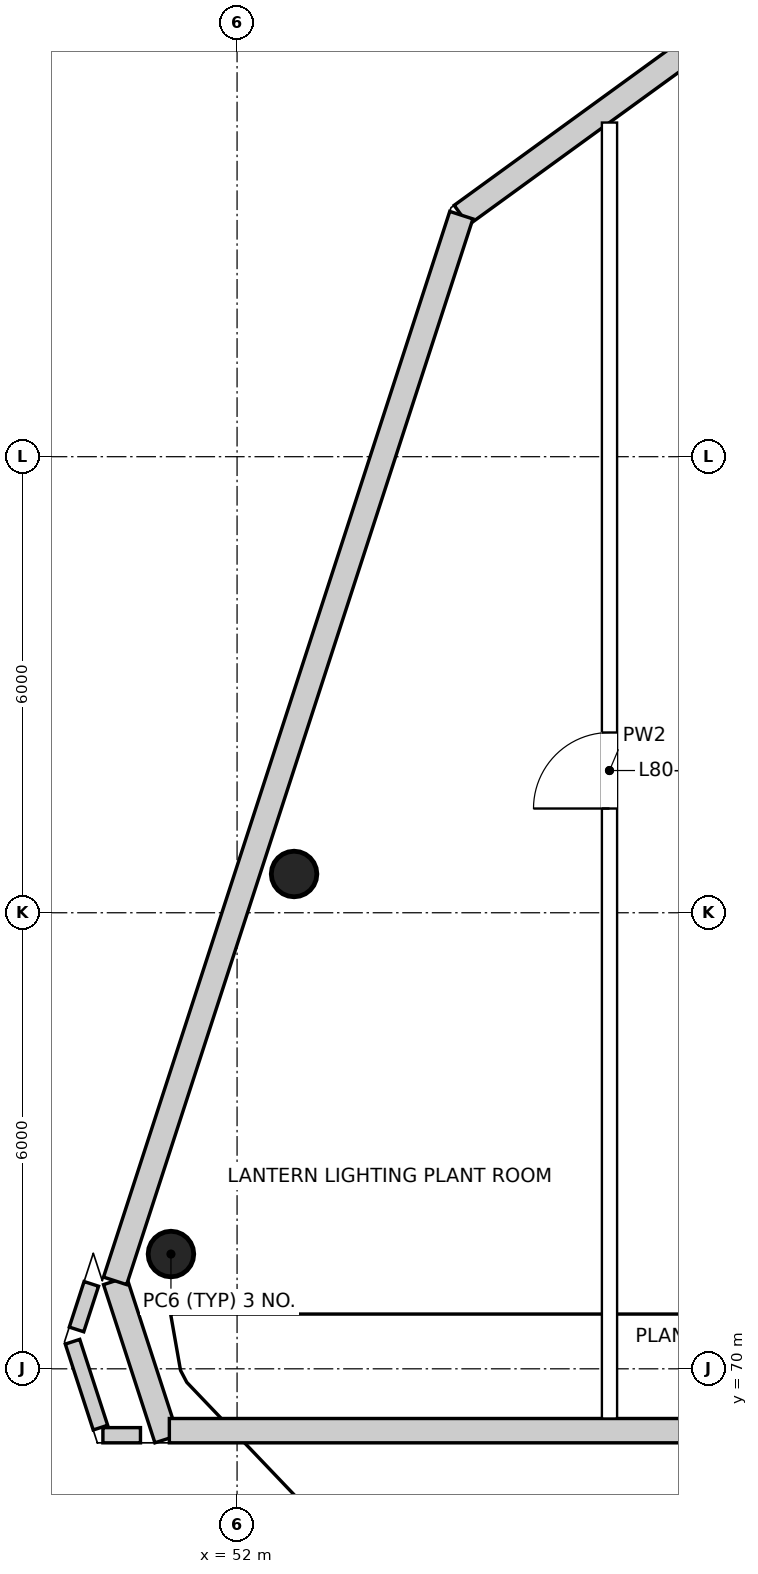
"""IFC4 building model, lengths in metres.
Left out: names, types, materials, properties, quantities, classifications, styles, units other than length and angle.
Written with IfcOpenShell. Run it as: python <this file> out.ifc"""

import sys

from ifc_helpers import new_model, si_unit, direction, frame, frame_2d, origin, origin_2d, place, context, subcontext, project, spatial, polyline, rectangle, circle, outline, extrude, element, fill, save


model = new_model("IFC4")
c1 = context("Model", 3, precision=1e-05, world=origin(), true_north=direction((0.0, 1.0)))
c2 = subcontext(c1, "Body", "Model", "MODEL_VIEW")
j1 = project(units=[si_unit("LENGTHUNIT", "METRE"), si_unit("PLANEANGLEUNIT", "RADIAN")], contexts=[c1])
p1 = place(None, origin())
s1 = spatial("IfcSite", under=j1, at=p1, CompositionType="ELEMENT")
p2 = place(p1, origin())
s2 = spatial("IfcBuilding", under=s1, at=p2, CompositionType="ELEMENT")
p3 = place(p2, frame((0.0, 0.0, 342.2)))
s3 = spatial("IfcBuildingStorey", under=s2, at=p3, CompositionType="ELEMENT", Elevation=342.2)
for number, where, z_axis, x_axis in (
    (1, (52.75, 76.51, 0.0), (0.0, 0.0, 1.0), (1.0, 0.0, 0.0)),
    (2, (51.13, 71.51, 0.0), (0.0, 0.0, 1.0), (1.0, 0.0, 0.0)),
):
    element("IfcColumn", number, at=place(p3, frame(where, z_axis=z_axis, x_axis=x_axis)), inside=s3, PredefinedType="COLUMN", context=c2, shape_type="SweptSolid", body=[
        extrude(circle(Radius=0.3, at=origin_2d()), origin(), (0.0, 0.0, 1.0), 4.5),
    ])
p4 = place(p3, frame((50.395, 71.157, 0.0), z_axis=(0.0, 0.0, 1.0), x_axis=(0.308990223282, -0.951065214334, 0.0)))
e3 = element("IfcWall", 3, at=p4, inside=s3, PredefinedType="SOLIDWALL", context=c2, shape_type="SweptSolid", body=[
    extrude(outline(polyline([(0.0, 0.0), (2.189, 0.0), (2.189, 2.744), (0.459, 4.2), (0.0, 4.2), (0.0, 0.0)])), frame((0.0, 0.16, 0.0), z_axis=(0.0, -1.0, 0.0), x_axis=(1.0, 0.0, 0.0)), (0.0, 0.0, 1.0), 0.32),
])
p5 = place(p3, frame((58.615, 87.84, 0.0), z_axis=(0.0, 0.0, 1.0), x_axis=(-0.809027332235, -0.587771023186, 0.0)))
e4 = element("IfcWall", 4, at=p5, inside=s3, PredefinedType="SOLIDWALL", context=c2, shape_type="SweptSolid", body=[
    extrude(rectangle(XDim=4.53, YDim=0.32, at=frame_2d((2.265, 0.0))), origin(), (0.0, 0.0, 1.0), 4.2),
])
p6 = place(p3, frame((54.95, 85.178, 0.0), z_axis=(0.0, 0.0, 1.0), x_axis=(-0.309009679663, -0.951058892958, 0.0)))
e5 = element("IfcWall", 5, at=p6, inside=s3, PredefinedType="SOLIDWALL", context=c2, shape_type="SweptSolid", body=[
    extrude(rectangle(XDim=14.742, YDim=0.32, at=frame_2d((7.371, 0.0))), origin(), (0.0, 0.0, 1.0), 4.2),
])
p7 = place(p3, frame((51.109, 69.186, 0.0), z_axis=(0.0, 0.0, 1.0), x_axis=(1.0, 0.0, 0.0)))
e6 = element("IfcWall", 6, at=p7, inside=s3, PredefinedType="SOLIDWALL", context=c2, shape_type="SweptSolid", body=[
    extrude(rectangle(XDim=37.782, YDim=0.32, at=frame_2d((18.891, 0.0))), origin(), (0.0, 0.0, 1.0), 2.842),
])
p8 = place(p3, frame((50.729, 69.126, 0.0), z_axis=(0.0, 0.0, 1.0), x_axis=(-1.0, 0.0, 0.0)))
e7 = element("IfcWall", 7, at=p8, inside=s3, PredefinedType="SOLIDWALL", context=c2, shape_type="SweptSolid", body=[
    extrude(rectangle(XDim=0.494, YDim=0.2, at=frame_2d((0.247, 0.0))), origin(), (0.0, 0.0, 1.0), 1.1),
])
p9 = place(p3, frame((50.202, 69.226, 0.0), z_axis=(0.0, 0.0, 1.0), x_axis=(-0.309067485778, 0.951040109162, 0.0)))
e8 = element("IfcWall", 8, at=p9, inside=s3, PredefinedType="SOLIDWALL", context=c2, shape_type="SweptSolid", body=[
    extrude(rectangle(XDim=1.188, YDim=0.2, at=frame_2d((0.594, 0.0))), origin(), (0.0, 0.0, 1.0), 1.1),
])
p10 = place(p3, frame((49.888, 70.518, 0.0), z_axis=(0.0, 0.0, 1.0), x_axis=(0.309129868594, 0.951019833833, 0.0)))
e9 = element("IfcWall", 9, at=p10, inside=s3, PredefinedType="SOLIDWALL", context=c2, shape_type="SweptSolid", body=[
    extrude(rectangle(XDim=0.63, YDim=0.2, at=frame_2d((0.315, 0.0))), origin(), (0.0, 0.0, 1.0), 1.1),
])
p11 = place(p3, frame((56.9, 69.346, 0.0), z_axis=(0.0, 0.0, 1.0), x_axis=(0.0, 1.0, 0.0)))
e10 = element("IfcWall", 10, at=p11, inside=s3, PredefinedType="PARTITIONING", context=c2, shape_type="SweptSolid", body=[
    extrude(outline(polyline([(0.0, 0.0), (17.05, 0.0), (17.05, 4.2), (0.0, 2.833), (0.0, 0.0)])), frame((0.0, 0.1, 0.0), z_axis=(0.0, -1.0, 0.0), x_axis=(1.0, 0.0, 0.0)), (0.0, 0.0, 1.0), 0.2),
])
p12 = place(p11, frame((8.025, 0.0, 0.0)))
e11 = element("IfcOpeningElement", 11, at=p12, cuts=e10, PredefinedType="OPENING", context=c2, shape_type="SweptSolid", body=[
    extrude(rectangle(XDim=1.0, YDim=2.1, at=frame_2d((0.5, 1.05))), frame((0.0, 0.11, 0.0), z_axis=(0.0, -1.0, 0.0), x_axis=(1.0, 0.0, 0.0)), (0.0, 0.0, 1.0), 0.22),
])
p13 = place(p12, origin())
e12 = element("IfcDoor", 12, at=p13, inside=s3, OperationType="SINGLE_SWING_LEFT", PredefinedType="DOOR", context=c2, shape_type="SweptSolid", body=[
    extrude(rectangle(XDim=1.0, YDim=2.1, at=frame_2d((0.5, 1.05))), frame((0.0, 0.025, 0.0), z_axis=(0.0, -1.0, 0.0), x_axis=(1.0, 0.0, 0.0)), (0.0, 0.0, 1.0), 0.05),
])
fill(e11, e12)
save(model, sys.argv[1])
